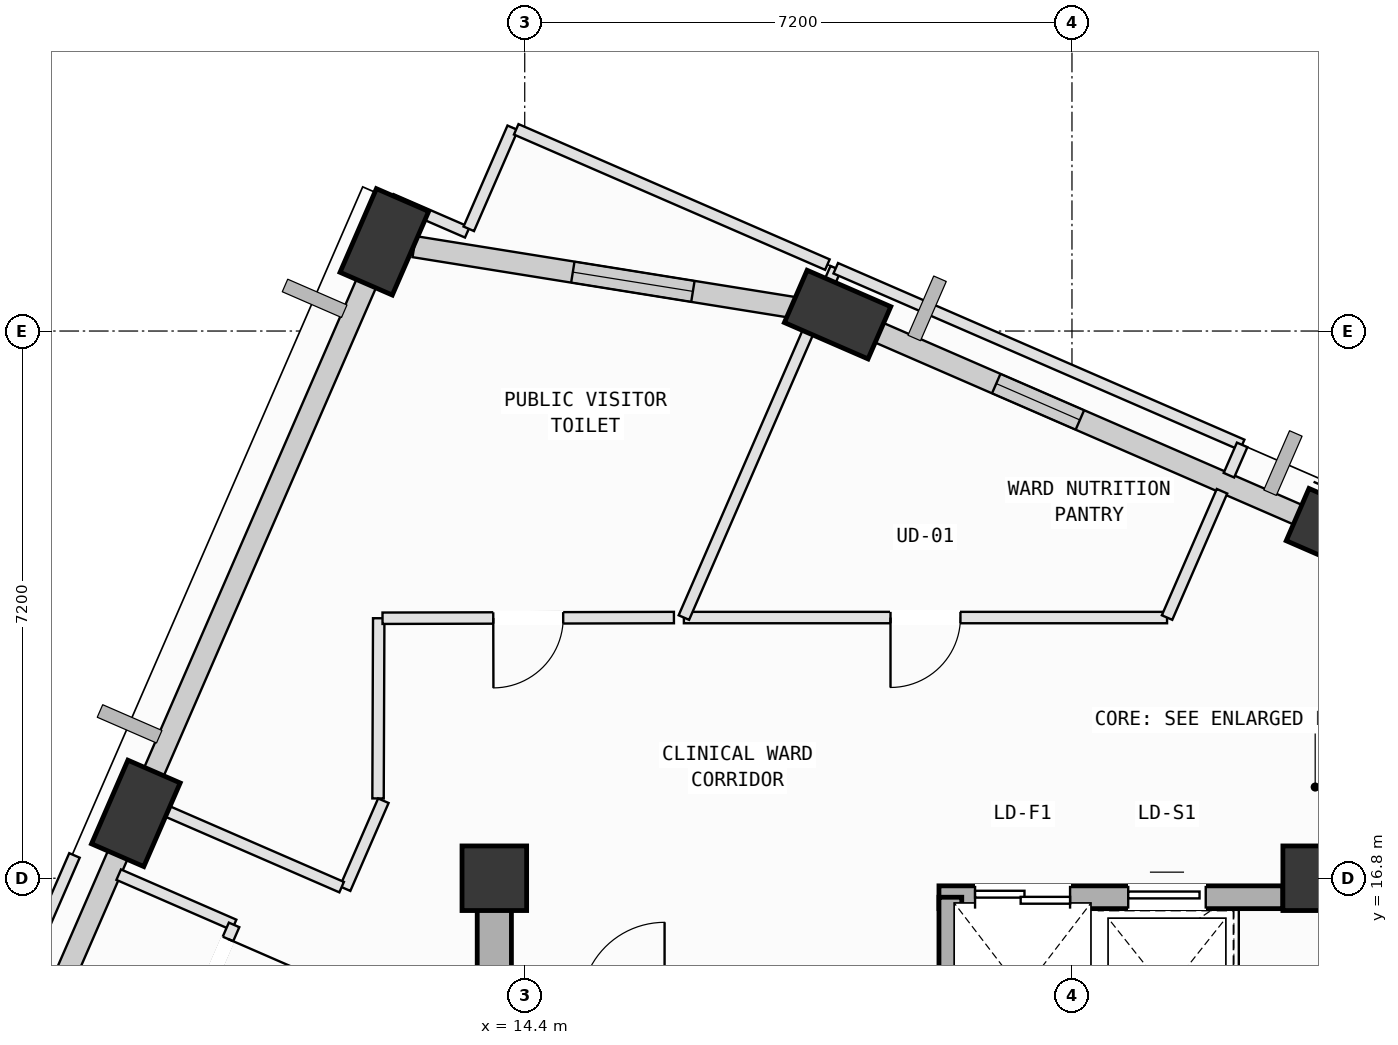
"""IFC4 building model, lengths in metres.
Left out: names, types, materials, properties, quantities, classifications, styles, units other than length and angle.
Written with IfcOpenShell. Run it as: python <this file> out.ifc"""

import sys

from ifc_helpers import new_model, si_unit, direction, frame, frame_2d, origin, origin_2d, place, context, subcontext, project, spatial, rectangle, extrude, element, fill, save


model = new_model("IFC4")
c1 = context("Model", 3, precision=1e-05, world=origin(), true_north=direction((0.0, 1.0)))
c2 = subcontext(c1, "Body", "Model", "MODEL_VIEW")
j1 = project(units=[si_unit("LENGTHUNIT", "METRE"), si_unit("PLANEANGLEUNIT", "RADIAN")], contexts=[c1])
p1 = place(None, origin())
s1 = spatial("IfcSite", under=j1, at=p1, CompositionType="ELEMENT")
p2 = place(p1, origin())
s2 = spatial("IfcBuilding", under=s1, at=p2, CompositionType="ELEMENT")
p3 = place(p2, frame((0.0, 0.0, 316.6)))
s3 = spatial("IfcBuildingStorey", under=s2, at=p3, CompositionType="ELEMENT", Elevation=316.6)
for number, where, z_axis, x_axis in (
    (1, (14.0, 16.8, 0.0), (0.0, 0.0, 1.0), (1.0, 0.0, 0.0)),
    (2, (24.8, 16.8, 0.0), (0.0, 0.0, 1.0), (1.0, 0.0, 0.0)),
):
    element("IfcColumn", number, at=place(p3, frame(where, z_axis=z_axis, x_axis=x_axis)), inside=s3, PredefinedType="COLUMN", context=c2, shape_type="SweptSolid", body=[
        extrude(rectangle(XDim=0.85, YDim=0.85, at=origin_2d()), origin(), (0.0, 0.0, 1.0), 4.0),
    ])
for number, where, z_axis, x_axis in (
    (3, (25.119, 21.345, 0.002), (0.0, 0.0, 1.0), (-0.917, 0.399, 0.0)),
    (4, (18.516, 24.216, 0.002), (0.0, 0.0, 1.0), (-0.917, 0.399, 0.0)),
    (5, (12.553, 25.173, 0.002), (0.0, 0.0, 1.0), (0.399, 0.917, 0.0)),
    (6, (9.283, 17.654, 0.002), (0.0, 0.0, 1.0), (0.399, 0.917, 0.0)),
):
    element("IfcColumn", number, at=place(p3, frame(where, z_axis=z_axis, x_axis=x_axis)), inside=s3, PredefinedType="COLUMN", context=c2, shape_type="SweptSolid", body=[
        extrude(rectangle(XDim=1.2, YDim=0.75, at=origin_2d()), origin(), (0.0, 0.0, 1.0), 3.996),
    ])
p4 = place(p3, frame((18.881, 24.058, 0.0), z_axis=(0.0, 0.0, 1.0), x_axis=(0.917070056253, -0.398726111414, 0.0)))
e7 = element("IfcWall", 7, at=p4, inside=s3, PredefinedType="SOLIDWALL", context=c2, shape_type="SweptSolid", body=[
    extrude(rectangle(XDim=6.405, YDim=0.28, at=frame_2d((3.202, 0.0))), origin(), (0.0, 0.0, 1.0), 3.265),
])
p5 = place(p4, frame((1.879, 0.0, 0.75)))
e8 = element("IfcOpeningElement", 8, at=p5, cuts=e7, PredefinedType="OPENING", context=c2, shape_type="SweptSolid", body=[
    extrude(rectangle(XDim=1.2, YDim=1.75, at=frame_2d((0.6, 0.875))), frame((0.0, 0.15, 0.0), z_axis=(0.0, -1.0, 0.0), x_axis=(1.0, 0.0, 0.0)), (0.0, 0.0, 1.0), 0.3),
])
p6 = place(p3, frame((12.946, 25.11, 0.0), z_axis=(0.0, 0.0, 1.0), x_axis=(0.987363821305, -0.158469821666, 0.0)))
e9 = element("IfcWall", 9, at=p6, inside=s3, PredefinedType="SOLIDWALL", context=c2, shape_type="SweptSolid", body=[
    extrude(rectangle(XDim=5.244, YDim=0.28, at=frame_2d((2.622, 0.0))), origin(), (0.0, 0.0, 1.0), 3.265),
])
p7 = place(p6, frame((2.114, 0.0, 0.75)))
e10 = element("IfcOpeningElement", 10, at=p7, cuts=e9, PredefinedType="OPENING", context=c2, shape_type="SweptSolid", body=[
    extrude(rectangle(XDim=1.6, YDim=1.95, at=frame_2d((0.8, 0.975))), frame((0.0, 0.15, 0.0), z_axis=(0.0, -1.0, 0.0), x_axis=(1.0, 0.0, 0.0)), (0.0, 0.0, 1.0), 0.3),
])
p8 = place(p3, frame((9.442, 18.018, 0.0), z_axis=(0.0, 0.0, 1.0), x_axis=(0.398768305896, 0.917051709672, 0.0)))
e11 = element("IfcWall", 11, at=p8, inside=s3, PredefinedType="SOLIDWALL", context=c2, shape_type="SweptSolid", body=[
    extrude(rectangle(XDim=7.405, YDim=0.28, at=frame_2d((3.703, 0.0))), origin(), (0.0, 0.0, 1.0), 3.265),
])
p9 = place(p3, frame((6.172, 10.498, 0.0), z_axis=(0.0, 0.0, 1.0), x_axis=(0.398740578379, 0.917063766133, 0.0)))
e12 = element("IfcWall", 12, at=p9, inside=s3, PredefinedType="SOLIDWALL", context=c2, shape_type="SweptSolid", body=[
    extrude(rectangle(XDim=7.405, YDim=0.28, at=frame_2d((3.702, 0.0))), origin(), (0.0, 0.0, 1.0), 3.265),
])
p10 = place(p3, frame((14.0, 16.8, 0.0), z_axis=(0.0, 0.0, 1.0), x_axis=(0.0, -1.0, 0.0)))
e13 = element("IfcWall", 13, at=p10, inside=s3, PredefinedType="SHEAR", context=c2, shape_type="SweptSolid", body=[
    extrude(rectangle(XDim=9.0, YDim=0.45, at=frame_2d((4.5, 0.0))), origin(), (0.0, 0.0, 1.0), 3.78),
])
p11 = place(p3, frame((19.85, 16.55, 0.0), z_axis=(0.0, 0.0, 1.0), x_axis=(1.0, 0.0, 0.0)))
e14 = element("IfcWall", 14, at=p11, inside=s3, PredefinedType="SOLIDWALL", context=c2, shape_type="SweptSolid", body=[
    extrude(rectangle(XDim=4.525, YDim=0.3, at=frame_2d((2.262, 0.0))), origin(), (0.0, 0.0, 1.0), 3.78),
])
p12 = place(p11, frame((0.475, 0.0, 0.0)))
e15 = element("IfcOpeningElement", 15, at=p12, cuts=e14, PredefinedType="OPENING", context=c2, shape_type="SweptSolid", body=[
    extrude(rectangle(XDim=1.25, YDim=2.18, at=frame_2d((0.625, 1.09))), frame((0.0, 0.16, 0.0), z_axis=(0.0, -1.0, 0.0), x_axis=(1.0, 0.0, 0.0)), (0.0, 0.0, 1.0), 0.32),
])
p13 = place(p11, frame((2.49, 0.0, 0.0)))
e16 = element("IfcOpeningElement", 16, at=p13, cuts=e14, PredefinedType="OPENING", context=c2, shape_type="SweptSolid", body=[
    extrude(rectangle(XDim=1.02, YDim=2.12, at=frame_2d((0.51, 1.06))), frame((0.0, 0.16, 0.0), z_axis=(0.0, -1.0, 0.0), x_axis=(1.0, 0.0, 0.0)), (0.0, 0.0, 1.0), 0.32),
])
p14 = place(p3, frame((20.0, 13.82, 0.0), z_axis=(0.0, 0.0, 1.0), x_axis=(0.0, 1.0, 0.0)))
e17 = element("IfcWall", 17, at=p14, inside=s3, PredefinedType="SOLIDWALL", context=c2, shape_type="SweptSolid", body=[
    extrude(rectangle(XDim=2.73, YDim=0.3, at=frame_2d((1.365, 0.0))), origin(), (0.0, 0.0, 1.0), 3.78),
])
p15 = place(p3, frame((22.851, 20.23, 0.0), z_axis=(0.0, 0.0, 1.0), x_axis=(-1.0, 0.0, 0.0)))
e18 = element("IfcWall", 18, at=p15, inside=s3, PredefinedType="PARTITIONING", context=c2, shape_type="SweptSolid", body=[
    extrude(rectangle(XDim=6.357, YDim=0.15, at=frame_2d((3.179, 0.0))), origin(), (0.0, 0.0, 1.0), 3.415),
])
p16 = place(p15, frame((2.719, 0.0, 0.0)))
e19 = element("IfcOpeningElement", 19, at=p16, cuts=e18, PredefinedType="OPENING", context=c2, shape_type="SweptSolid", body=[
    extrude(rectangle(XDim=0.92, YDim=2.1, at=frame_2d((0.46, 1.05))), frame((0.0, 0.085, 0.0), z_axis=(0.0, -1.0, 0.0), x_axis=(1.0, 0.0, 0.0)), (0.0, 0.0, 1.0), 0.17),
])
p17 = place(p3, frame((16.494, 20.23, 0.0), z_axis=(0.0, 0.0, 1.0), x_axis=(0.398694046718, 0.917083996759, 0.0)))
e20 = element("IfcWall", 20, at=p17, inside=s3, PredefinedType="PARTITIONING", context=c2, shape_type="SweptSolid", body=[
    extrude(rectangle(XDim=5.011, YDim=0.15, at=frame_2d((2.506, 0.0))), origin(), (0.0, 0.0, 1.0), 2.765),
])
p18 = place(p3, frame((18.492, 24.826, 0.0), z_axis=(0.0, 0.0, 1.0), x_axis=(0.917125302545, -0.398599020862, 0.0)))
e21 = element("IfcWall", 21, at=p18, inside=s3, PredefinedType="PARTITIONING", context=c2, shape_type="SweptSolid", body=[
    extrude(rectangle(XDim=5.83, YDim=0.15, at=frame_2d((2.915, 0.0))), origin(), (0.0, 0.0, 1.0), 3.78),
])
p19 = place(p3, frame((23.839, 22.502, 0.0), z_axis=(0.0, 0.0, 1.0), x_axis=(-0.399935888769, -0.916543116757, 0.0)))
e22 = element("IfcWall", 22, at=p19, inside=s3, PredefinedType="PARTITIONING", context=c2, shape_type="SweptSolid", body=[
    extrude(rectangle(XDim=0.435, YDim=0.15, at=frame_2d((0.218, 0.0))), origin(), (0.0, 0.0, 1.0), 3.78),
])
p20 = place(p3, frame((23.574, 21.892, 0.0), z_axis=(0.0, 0.0, 1.0), x_axis=(-0.398839391352, -0.917020795787, 0.0)))
e23 = element("IfcWall", 23, at=p20, inside=s3, PredefinedType="PARTITIONING", context=c2, shape_type="SweptSolid", body=[
    extrude(rectangle(XDim=1.812, YDim=0.15, at=frame_2d((0.906, 0.0))), origin(), (0.0, 0.0, 1.0), 3.78),
])
p21 = place(p3, frame((12.479, 20.221, 0.0), z_axis=(0.0, 0.0, 1.0), x_axis=(-0.003810084589, -0.999992741601, 0.0)))
e24 = element("IfcWall", 24, at=p21, inside=s3, PredefinedType="PARTITIONING", context=c2, shape_type="SweptSolid", body=[
    extrude(rectangle(XDim=2.371, YDim=0.15, at=frame_2d((1.186, 0.0))), origin(), (0.0, 0.0, 1.0), 3.78),
])
p22 = place(p3, frame((12.54, 17.82, 0.0), z_axis=(0.0, 0.0, 1.0), x_axis=(-0.398655347011, -0.917100820139, 0.0)))
e25 = element("IfcWall", 25, at=p22, inside=s3, PredefinedType="PARTITIONING", context=c2, shape_type="SweptSolid", body=[
    extrude(rectangle(XDim=1.261, YDim=0.15, at=frame_2d((0.631, 0.0))), origin(), (0.0, 0.0, 1.0), 3.78),
])
p23 = place(p3, frame((11.991, 16.683, 0.0), z_axis=(0.0, 0.0, 1.0), x_axis=(-0.917068787669, 0.398729029146, 0.0)))
e26 = element("IfcWall", 26, at=p23, inside=s3, PredefinedType="PARTITIONING", context=c2, shape_type="SweptSolid", body=[
    extrude(rectangle(XDim=3.06, YDim=0.15, at=frame_2d((1.53, 0.0))), origin(), (0.0, 0.0, 1.0), 2.765),
])
p24 = place(p3, frame((12.22, 24.885, 0.0), z_axis=(0.0, 0.0, 1.0), x_axis=(0.399235297463, 0.916848502894, 0.0)))
e27 = element("IfcWall", 27, at=p24, inside=s3, PredefinedType="PARTITIONING", context=c2, shape_type="SweptSolid", body=[
    extrude(rectangle(XDim=0.947, YDim=0.15, at=frame_2d((0.473, 0.0))), origin(), (0.0, 0.0, 1.0), 3.265),
])
p25 = place(p3, frame((12.644, 25.733, 0.0), z_axis=(0.0, 0.0, 1.0), x_axis=(0.9173866736, -0.397997099362, 0.0)))
e28 = element("IfcWall", 28, at=p25, inside=s3, PredefinedType="PARTITIONING", context=c2, shape_type="SweptSolid", body=[
    extrude(rectangle(XDim=1.09, YDim=0.15, at=frame_2d((0.545, 0.0))), origin(), (0.0, 0.0, 1.0), 3.265),
])
p26 = place(p3, frame((13.664, 25.345, 0.0), z_axis=(0.0, 0.0, 1.0), x_axis=(0.398732271116, 0.917067378097, 0.0)))
e29 = element("IfcWall", 29, at=p26, inside=s3, PredefinedType="PARTITIONING", context=c2, shape_type="SweptSolid", body=[
    extrude(rectangle(XDim=1.449, YDim=0.15, at=frame_2d((0.725, 0.0))), origin(), (0.0, 0.0, 1.0), 3.78),
])
p27 = place(p3, frame((14.288, 26.654, 0.0), z_axis=(0.0, 0.0, 1.0), x_axis=(0.91706744789, -0.398732110595, 0.0)))
e30 = element("IfcWall", 30, at=p27, inside=s3, PredefinedType="PARTITIONING", context=c2, shape_type="SweptSolid", body=[
    extrude(rectangle(XDim=4.464, YDim=0.15, at=frame_2d((2.232, 0.0))), origin(), (0.0, 0.0, 1.0), 3.78),
])
p28 = place(p3, frame((16.363, 20.23, 0.0), z_axis=(0.0, 0.0, 1.0), x_axis=(-0.999997224437, -0.002356081082, 0.0)))
e31 = element("IfcWall", 31, at=p28, inside=s3, PredefinedType="PARTITIONING", context=c2, shape_type="SweptSolid", body=[
    extrude(rectangle(XDim=3.834, YDim=0.15, at=frame_2d((1.917, 0.0))), origin(), (0.0, 0.0, 1.0), 3.415),
])
p29 = place(p28, frame((1.457, 0.0, 0.0)))
e32 = element("IfcOpeningElement", 32, at=p29, cuts=e31, PredefinedType="OPENING", context=c2, shape_type="SweptSolid", body=[
    extrude(rectangle(XDim=0.92, YDim=2.1, at=frame_2d((0.46, 1.05))), frame((0.0, 0.085, 0.0), z_axis=(0.0, -1.0, 0.0), x_axis=(1.0, 0.0, 0.0)), (0.0, 0.0, 1.0), 0.17),
])
p30 = place(p3, frame((5.828, 11.01, 0.0), z_axis=(0.0, 0.0, 1.0), x_axis=(0.398767783479, 0.917051936838, 0.0)))
e33 = element("IfcWall", 33, at=p30, inside=s3, PredefinedType="PARTITIONING", context=c2, shape_type="SweptSolid", body=[
    extrude(rectangle(XDim=6.641, YDim=0.15, at=frame_2d((3.32, 0.0))), origin(), (0.0, 0.0, 1.0), 3.78),
])
p31 = place(p3, frame((9.058, 16.847, 0.0), z_axis=(0.0, 0.0, 1.0), x_axis=(0.916856565806, -0.399216780382, 0.0)))
e34 = element("IfcWall", 34, at=p31, inside=s3, PredefinedType="PARTITIONING", context=c2, shape_type="SweptSolid", body=[
    extrude(rectangle(XDim=1.656, YDim=0.15, at=frame_2d((0.828, 0.0))), origin(), (0.0, 0.0, 1.0), 3.78),
])
p32 = place(p3, frame((10.576, 16.186, 0.0), z_axis=(0.0, 0.0, 1.0), x_axis=(-0.39896901737, -0.916964406713, 0.0)))
e35 = element("IfcWall", 35, at=p32, inside=s3, PredefinedType="PARTITIONING", context=c2, shape_type="SweptSolid", body=[
    extrude(rectangle(XDim=1.323, YDim=0.15, at=frame_2d((0.662, 0.0))), origin(), (0.0, 0.0, 1.0), 3.78),
])
p33 = place(p32, frame((0.201, 0.0, 0.0)))
e36 = element("IfcOpeningElement", 36, at=p33, cuts=e35, PredefinedType="OPENING", context=c2, shape_type="SweptSolid", body=[
    extrude(rectangle(XDim=0.92, YDim=2.1, at=frame_2d((0.46, 1.05))), frame((0.0, 0.085, 0.0), z_axis=(0.0, -1.0, 0.0), x_axis=(1.0, 0.0, 0.0)), (0.0, 0.0, 1.0), 0.17),
])
p34 = place(p5, origin())
e37 = element("IfcWindow", 37, at=p34, inside=s3, PartitioningType="SINGLE_PANEL", PredefinedType="WINDOW", context=c2, shape_type="SweptSolid", body=[
    extrude(rectangle(XDim=1.2, YDim=1.75, at=frame_2d((0.6, 0.875))), frame((0.0, 0.03, 0.0), z_axis=(0.0, -1.0, 0.0), x_axis=(1.0, 0.0, 0.0)), (0.0, 0.0, 1.0), 0.06),
])
fill(e8, e37)
p35 = place(p7, origin())
e38 = element("IfcWindow", 38, at=p35, inside=s3, PartitioningType="SINGLE_PANEL", PredefinedType="WINDOW", context=c2, shape_type="SweptSolid", body=[
    extrude(rectangle(XDim=1.6, YDim=1.95, at=frame_2d((0.8, 0.975))), frame((0.0, 0.03, 0.0), z_axis=(0.0, -1.0, 0.0), x_axis=(1.0, 0.0, 0.0)), (0.0, 0.0, 1.0), 0.06),
])
fill(e10, e38)
p36 = place(p12, origin())
e39 = element("IfcDoor", 39, at=p36, inside=s3, OperationType="DOUBLE_DOOR_SLIDING", PredefinedType="DOOR", context=c2, shape_type="SweptSolid", body=[
    extrude(rectangle(XDim=1.25, YDim=2.18, at=frame_2d((0.625, 1.09))), frame((0.0, 0.025, 0.0), z_axis=(0.0, -1.0, 0.0), x_axis=(1.0, 0.0, 0.0)), (0.0, 0.0, 1.0), 0.05),
])
fill(e15, e39)
p37 = place(p13, origin())
e40 = element("IfcDoor", 40, at=p37, inside=s3, OperationType="SLIDING_TO_LEFT", PredefinedType="DOOR", context=c2, shape_type="SweptSolid", body=[
    extrude(rectangle(XDim=1.02, YDim=2.12, at=frame_2d((0.51, 1.06))), frame((0.0, 0.025, 0.0), z_axis=(0.0, -1.0, 0.0), x_axis=(1.0, 0.0, 0.0)), (0.0, 0.0, 1.0), 0.05),
])
fill(e16, e40)
p38 = place(p16, origin())
e41 = element("IfcDoor", 41, at=p38, inside=s3, OperationType="SINGLE_SWING_RIGHT", PredefinedType="DOOR", context=c2, shape_type="SweptSolid", body=[
    extrude(rectangle(XDim=0.92, YDim=2.1, at=frame_2d((0.46, 1.05))), frame((0.0, 0.025, 0.0), z_axis=(0.0, -1.0, 0.0), x_axis=(1.0, 0.0, 0.0)), (0.0, 0.0, 1.0), 0.05),
])
fill(e19, e41)
p39 = place(p29, origin())
e42 = element("IfcDoor", 42, at=p39, inside=s3, OperationType="SINGLE_SWING_RIGHT", PredefinedType="DOOR", context=c2, shape_type="SweptSolid", body=[
    extrude(rectangle(XDim=0.92, YDim=2.1, at=frame_2d((0.46, 1.05))), frame((0.0, 0.025, 0.0), z_axis=(0.0, -1.0, 0.0), x_axis=(1.0, 0.0, 0.0)), (0.0, 0.0, 1.0), 0.05),
])
fill(e32, e42)
p40 = place(p33, origin())
e43 = element("IfcDoor", 43, at=p40, inside=s3, OperationType="SINGLE_SWING_LEFT", PredefinedType="DOOR", context=c2, shape_type="SweptSolid", body=[
    extrude(rectangle(XDim=0.92, YDim=2.1, at=frame_2d((0.46, 1.05))), frame((0.0, 0.025, 0.0), z_axis=(0.0, -1.0, 0.0), x_axis=(1.0, 0.0, 0.0)), (0.0, 0.0, 1.0), 0.05),
])
fill(e36, e43)
save(model, sys.argv[1])
